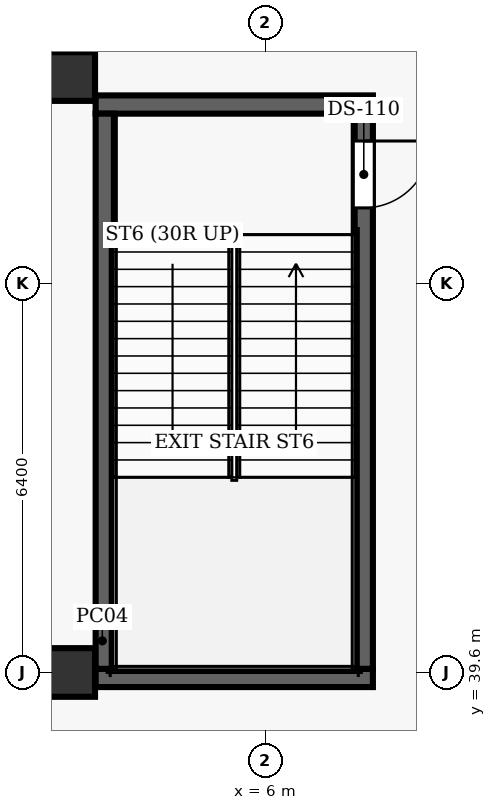
"""IFC4 building model, lengths in metres.
Left out: names, types, materials, properties, quantities, classifications, styles, units other than length and angle.
Written with IfcOpenShell. Run it as: python <this file> out.ifc"""

import sys

from ifc_helpers import new_model, si_unit, direction, frame, frame_2d, origin, origin_2d, place, context, subcontext, project, spatial, rectangle, extrude, element, fill, save


model = new_model("IFC4")
c1 = context("Model", 3, precision=1e-05, world=origin(), true_north=direction((0.0, 1.0)))
c2 = subcontext(c1, "Body", "Model", "MODEL_VIEW")
j1 = project(units=[si_unit("LENGTHUNIT", "METRE"), si_unit("PLANEANGLEUNIT", "RADIAN")], contexts=[c1])
p1 = place(None, origin())
s1 = spatial("IfcSite", under=j1, at=p1, CompositionType="ELEMENT")
p2 = place(p1, origin())
s2 = spatial("IfcBuilding", under=s1, at=p2, CompositionType="ELEMENT")
p3 = place(p2, frame((0.0, 0.0, 6.6)))
s3 = spatial("IfcBuildingStorey", under=s2, at=p3, CompositionType="ELEMENT", Elevation=6.6)
for number, where, z_axis, x_axis in (
    (1, (2.8, 39.6, 0.0), (0.0, 0.0, 1.0), (1.0, 0.0, 0.0)),
    (2, (2.8, 49.4, 0.0), (0.0, 0.0, 1.0), (1.0, 0.0, 0.0)),
):
    element("IfcColumn", number, at=place(p3, frame(where, z_axis=z_axis, x_axis=x_axis)), inside=s3, PredefinedType="COLUMN", context=c2, shape_type="SweptSolid", body=[
        extrude(rectangle(XDim=0.8, YDim=0.8, at=origin_2d()), origin(), (0.0, 0.0, 1.0), 5.4),
    ])
for number, where, z_axis, x_axis in (
    (3, (3.21, 39.51, 0.0), (0.0, 0.0, 1.0), (1.0, 0.0, 0.0)),
    (4, (3.21, 48.94, 0.0), (0.0, 0.0, 1.0), (1.0, 0.0, 0.0)),
):
    element("IfcWall", number, at=place(p3, frame(where, z_axis=z_axis, x_axis=x_axis)), inside=s3, PredefinedType="SHEAR", context=c2, shape_type="SweptSolid", body=[
        extrude(rectangle(XDim=4.56, YDim=0.3, at=frame_2d((2.28, 0.0))), origin(), (0.0, 0.0, 1.0), 5.4),
    ])
p4 = place(p3, frame((3.36, 39.66, 0.0), z_axis=(0.0, 0.0, 1.0), x_axis=(0.0, 1.0, 0.0)))
e5 = element("IfcWall", 5, at=p4, inside=s3, PredefinedType="SHEAR", context=c2, shape_type="SweptSolid", body=[
    extrude(rectangle(XDim=9.13, YDim=0.3, at=frame_2d((4.565, 0.0))), origin(), (0.0, 0.0, 1.0), 5.4),
])
p5 = place(p3, frame((7.62, 48.79, 0.0), z_axis=(0.0, 0.0, 1.0), x_axis=(0.0, -1.0, 0.0)))
e6 = element("IfcWall", 6, at=p5, inside=s3, PredefinedType="SHEAR", context=c2, shape_type="SweptSolid", body=[
    extrude(rectangle(XDim=9.13, YDim=0.3, at=frame_2d((4.565, 0.0))), origin(), (0.0, 0.0, 1.0), 5.4),
])
p6 = place(p5, frame((0.45, 0.0, 0.0)))
e7 = element("IfcOpeningElement", 7, at=p6, cuts=e6, PredefinedType="OPENING", context=c2, shape_type="SweptSolid", body=[
    extrude(rectangle(XDim=1.1, YDim=2.15, at=frame_2d((0.55, 1.075))), frame((0.0, 0.16, 0.0), z_axis=(0.0, -1.0, 0.0), x_axis=(1.0, 0.0, 0.0)), (0.0, 0.0, 1.0), 0.32),
])
p7 = place(p6, origin())
e8 = element("IfcDoor", 8, at=p7, inside=s3, OperationType="SINGLE_SWING_LEFT", PredefinedType="DOOR", context=c2, shape_type="SweptSolid", body=[
    extrude(rectangle(XDim=1.1, YDim=2.15, at=frame_2d((0.55, 1.075))), frame((0.0, 0.025, 0.0), z_axis=(0.0, -1.0, 0.0), x_axis=(1.0, 0.0, 0.0)), (0.0, 0.0, 1.0), 0.05),
])
fill(e7, e8)
save(model, sys.argv[1])
